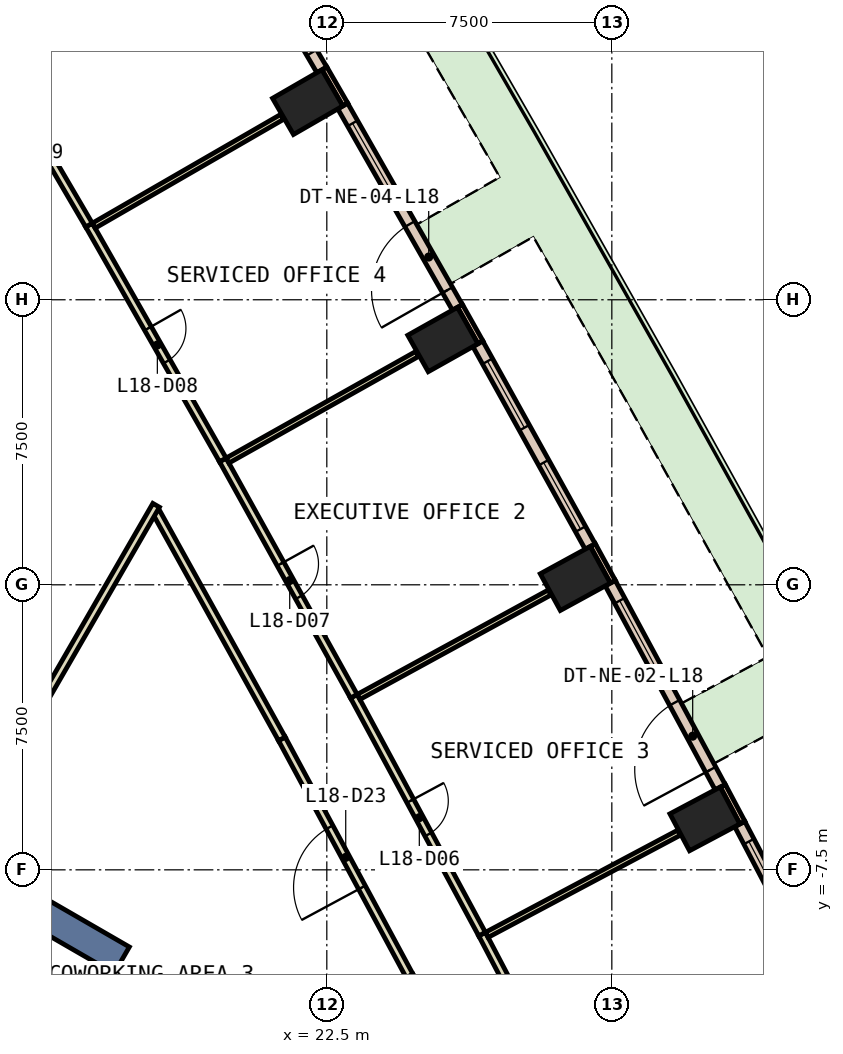
"""IFC4 building model, lengths in metres.
Left out: names, types, materials, properties, quantities, classifications, styles, units other than length and angle.
Written with IfcOpenShell. Run it as: python <this file> out.ifc"""

import sys

from ifc_helpers import new_model, si_unit, direction, frame, frame_2d, origin, origin_2d, place, context, subcontext, project, spatial, rectangle, extrude, element, fill, save


model = new_model("IFC4")
c1 = context("Model", 3, precision=1e-05, world=origin(), true_north=direction((0.0, 1.0)))
c2 = subcontext(c1, "Body", "Model", "MODEL_VIEW")
j1 = project(units=[si_unit("LENGTHUNIT", "METRE"), si_unit("PLANEANGLEUNIT", "RADIAN")], contexts=[c1])
p1 = place(None, origin())
s1 = spatial("IfcSite", under=j1, at=p1, CompositionType="ELEMENT")
p2 = place(p1, origin())
s2 = spatial("IfcBuilding", under=s1, at=p2, CompositionType="ELEMENT")
p3 = place(p2, frame((0.0, 0.0, 86.6)))
s3 = spatial("IfcBuildingStorey", under=s2, at=p3, CompositionType="ELEMENT", Elevation=86.6)
for number, where, z_axis, x_axis in (
    (1, (32.449, -6.16, 0.0), (0.0, 0.0, 1.0), (-0.469, 0.883, 0.0)),
    (2, (29.039, 0.167, 0.0), (0.0, 0.0, 1.0), (-0.48, 0.877, 0.0)),
    (3, (25.554, 6.454, 0.0), (0.0, 0.0, 1.0), (-0.49, 0.872, 0.0)),
    (4, (21.997, 12.7, 0.0), (0.0, 0.0, 1.0), (-0.5, 0.866, 0.0)),
):
    element("IfcColumn", number, at=place(p3, frame(where, z_axis=z_axis, x_axis=x_axis)), inside=s3, PredefinedType="COLUMN", context=c2, shape_type="SweptSolid", body=[
        extrude(rectangle(XDim=1.1, YDim=1.5, at=origin_2d()), origin(), (0.0, 0.0, 1.0), 3.8),
    ])
p4 = place(p3, frame((9.31, -5.375, -0.6), z_axis=(0.0, 0.0, 1.0), x_axis=(0.866017533419, -0.500013631625, 0.0)))
e5 = element("IfcWall", 5, at=p4, inside=s3, PredefinedType="SHEAR", context=c2, shape_type="SweptSolid", body=[
    extrude(rectangle(XDim=9.0, YDim=0.8, at=frame_2d((4.5, 0.0))), origin(), (0.0, 0.0, 1.0), 4.4),
])
p5 = place(p3, frame((33.436, -6.259, 0.0), z_axis=(0.0, 0.0, 1.0), x_axis=(-0.469366248657, 0.883003581319, 0.0)))
e6 = element("IfcWall", 6, at=p5, inside=s3, PredefinedType="STANDARD", context=c2, shape_type="SweptSolid", body=[
    extrude(rectangle(XDim=1.1, YDim=0.15, at=frame_2d((0.55, 0.0))), origin(), (0.0, 0.0, 1.0), 3.8),
])
p6 = place(p3, frame((30.027, 0.08, 0.0), z_axis=(0.0, 0.0, 1.0), x_axis=(-0.479737645119, 0.877411985247, 0.0)))
e7 = element("IfcWall", 7, at=p6, inside=s3, PredefinedType="STANDARD", context=c2, shape_type="SweptSolid", body=[
    extrude(rectangle(XDim=1.101, YDim=0.15, at=frame_2d((0.55, 0.0))), origin(), (0.0, 0.0, 1.0), 3.8),
])
p7 = place(p3, frame((26.543, 6.379, 0.0), z_axis=(0.0, 0.0, 1.0), x_axis=(-0.490008344094, 0.871717742574, 0.0)))
e8 = element("IfcWall", 8, at=p7, inside=s3, PredefinedType="STANDARD", context=c2, shape_type="SweptSolid", body=[
    extrude(rectangle(XDim=1.1, YDim=0.15, at=frame_2d((0.55, 0.0))), origin(), (0.0, 0.0, 1.0), 3.8),
])
p8 = place(p3, frame((22.986, 12.636, 0.0), z_axis=(0.0, 0.0, 1.0), x_axis=(-0.499837685251, 0.86611909597, 0.0)))
e9 = element("IfcWall", 9, at=p8, inside=s3, PredefinedType="STANDARD", context=c2, shape_type="SweptSolid", body=[
    extrude(rectangle(XDim=1.1, YDim=0.15, at=frame_2d((0.55, 0.0))), origin(), (0.0, 0.0, 1.0), 3.8),
])
p9 = place(p3, frame((36.186, -11.676, 0.0), z_axis=(0.0, 0.0, 1.0), x_axis=(-0.464187178015, 0.885737130173, 0.0)))
e10 = element("IfcWall", 10, at=p9, inside=s3, PredefinedType="STANDARD", context=c2, shape_type="SweptSolid", body=[
    extrude(rectangle(XDim=6.075, YDim=0.3, at=frame_2d((3.038, 0.0))), origin(), (0.0, 0.0, 1.0), 3.8),
])
p10 = place(p9, frame((0.519, 0.0, 0.9)))
e11 = element("IfcOpeningElement", 11, at=p10, cuts=e10, PredefinedType="OPENING", context=c2, shape_type="SweptSolid", body=[
    extrude(rectangle(XDim=2.0, YDim=2.6, at=frame_2d((1.0, 1.3))), frame((0.0, 0.16, 0.0), z_axis=(0.0, -1.0, 0.0), x_axis=(1.0, 0.0, 0.0)), (0.0, 0.0, 1.0), 0.32),
])
p11 = place(p9, frame((3.556, 0.0, 0.9)))
e12 = element("IfcOpeningElement", 12, at=p11, cuts=e10, PredefinedType="OPENING", context=c2, shape_type="SweptSolid", body=[
    extrude(rectangle(XDim=2.0, YDim=2.6, at=frame_2d((1.0, 1.3))), frame((0.0, 0.16, 0.0), z_axis=(0.0, -1.0, 0.0), x_axis=(1.0, 0.0, 0.0)), (0.0, 0.0, 1.0), 0.32),
])
p12 = place(p3, frame((32.851, -5.325, 0.0), z_axis=(0.0, 0.0, 1.0), x_axis=(-0.474369552216, 0.880325807829, 0.0)))
e13 = element("IfcWall", 13, at=p12, inside=s3, PredefinedType="STANDARD", context=c2, shape_type="SweptSolid", body=[
    extrude(rectangle(XDim=6.099, YDim=0.3, at=frame_2d((3.049, 0.0))), origin(), (0.0, 0.0, 1.0), 3.8),
])
p13 = place(p12, frame((0.525, 0.0, 0.0)))
e14 = element("IfcOpeningElement", 14, at=p13, cuts=e13, PredefinedType="OPENING", context=c2, shape_type="SweptSolid", body=[
    extrude(rectangle(XDim=2.0, YDim=2.4, at=frame_2d((1.0, 1.2))), frame((0.0, 0.16, 0.0), z_axis=(0.0, -1.0, 0.0), x_axis=(1.0, 0.0, 0.0)), (0.0, 0.0, 1.0), 0.32),
])
p14 = place(p12, frame((3.574, 0.0, 0.9)))
e15 = element("IfcOpeningElement", 15, at=p14, cuts=e13, PredefinedType="OPENING", context=c2, shape_type="SweptSolid", body=[
    extrude(rectangle(XDim=2.0, YDim=2.6, at=frame_2d((1.0, 1.3))), frame((0.0, 0.16, 0.0), z_axis=(0.0, -1.0, 0.0), x_axis=(1.0, 0.0, 0.0)), (0.0, 0.0, 1.0), 0.32),
])
p15 = place(p3, frame((29.431, 1.007, 0.0), z_axis=(0.0, 0.0, 1.0), x_axis=(-0.484823579315, 0.874611969356, 0.0)))
e16 = element("IfcWall", 16, at=p15, inside=s3, PredefinedType="STANDARD", context=c2, shape_type="SweptSolid", body=[
    extrude(rectangle(XDim=6.099, YDim=0.3, at=frame_2d((3.049, 0.0))), origin(), (0.0, 0.0, 1.0), 3.8),
])
p16 = place(p15, frame((0.525, 0.0, 0.9)))
e17 = element("IfcOpeningElement", 17, at=p16, cuts=e16, PredefinedType="OPENING", context=c2, shape_type="SweptSolid", body=[
    extrude(rectangle(XDim=2.0, YDim=2.6, at=frame_2d((1.0, 1.3))), frame((0.0, 0.16, 0.0), z_axis=(0.0, -1.0, 0.0), x_axis=(1.0, 0.0, 0.0)), (0.0, 0.0, 1.0), 0.32),
])
p17 = place(p15, frame((3.574, 0.0, 0.9)))
e18 = element("IfcOpeningElement", 18, at=p17, cuts=e16, PredefinedType="OPENING", context=c2, shape_type="SweptSolid", body=[
    extrude(rectangle(XDim=2.0, YDim=2.6, at=frame_2d((1.0, 1.3))), frame((0.0, 0.16, 0.0), z_axis=(0.0, -1.0, 0.0), x_axis=(1.0, 0.0, 0.0)), (0.0, 0.0, 1.0), 0.32),
])
p18 = place(p3, frame((25.936, 7.299, 0.0), z_axis=(0.0, 0.0, 1.0), x_axis=(-0.49492259535, 0.868937065967, 0.0)))
e19 = element("IfcWall", 19, at=p18, inside=s3, PredefinedType="STANDARD", context=c2, shape_type="SweptSolid", body=[
    extrude(rectangle(XDim=6.098, YDim=0.3, at=frame_2d((3.049, 0.0))), origin(), (0.0, 0.0, 1.0), 3.8),
])
p19 = place(p18, frame((0.525, 0.0, 0.0)))
e20 = element("IfcOpeningElement", 20, at=p19, cuts=e19, PredefinedType="OPENING", context=c2, shape_type="SweptSolid", body=[
    extrude(rectangle(XDim=2.0, YDim=2.4, at=frame_2d((1.0, 1.2))), frame((0.0, 0.16, 0.0), z_axis=(0.0, -1.0, 0.0), x_axis=(1.0, 0.0, 0.0)), (0.0, 0.0, 1.0), 0.32),
])
p20 = place(p18, frame((3.574, 0.0, 0.9)))
e21 = element("IfcOpeningElement", 21, at=p20, cuts=e19, PredefinedType="OPENING", context=c2, shape_type="SweptSolid", body=[
    extrude(rectangle(XDim=2.0, YDim=2.6, at=frame_2d((1.0, 1.3))), frame((0.0, 0.16, 0.0), z_axis=(0.0, -1.0, 0.0), x_axis=(1.0, 0.0, 0.0)), (0.0, 0.0, 1.0), 0.32),
])
p21 = place(p3, frame((22.369, 13.549, 0.0), z_axis=(0.0, 0.0, 1.0), x_axis=(-0.504998117261, 0.863120444413, 0.0)))
e22 = element("IfcWall", 22, at=p21, inside=s3, PredefinedType="STANDARD", context=c2, shape_type="SweptSolid", body=[
    extrude(rectangle(XDim=6.099, YDim=0.3, at=frame_2d((3.049, 0.0))), origin(), (0.0, 0.0, 1.0), 3.8),
])
p22 = place(p21, frame((0.525, 0.0, 0.9)))
e23 = element("IfcOpeningElement", 23, at=p22, cuts=e22, PredefinedType="OPENING", context=c2, shape_type="SweptSolid", body=[
    extrude(rectangle(XDim=2.0, YDim=2.6, at=frame_2d((1.0, 1.3))), frame((0.0, 0.16, 0.0), z_axis=(0.0, -1.0, 0.0), x_axis=(1.0, 0.0, 0.0)), (0.0, 0.0, 1.0), 0.32),
])
p23 = place(p21, frame((3.574, 0.0, 0.9)))
e24 = element("IfcOpeningElement", 24, at=p23, cuts=e22, PredefinedType="OPENING", context=c2, shape_type="SweptSolid", body=[
    extrude(rectangle(XDim=2.0, YDim=2.6, at=frame_2d((1.0, 1.3))), frame((0.0, 0.16, 0.0), z_axis=(0.0, -1.0, 0.0), x_axis=(1.0, 0.0, 0.0)), (0.0, 0.0, 1.0), 0.32),
])
p24 = place(p3, frame((27.461, -15.6, 0.0), z_axis=(0.0, 0.0, 1.0), x_axis=(-0.464203280494, 0.885728691179, 0.0)))
e25 = element("IfcWall", 25, at=p24, inside=s3, PredefinedType="PARTITIONING", context=c2, shape_type="SweptSolid", body=[
    extrude(rectangle(XDim=5.995, YDim=0.2, at=frame_2d((2.998, 0.0))), origin(), (0.0, 0.0, 1.0), 3.8),
])
p25 = place(p3, frame((24.678, -10.29, 0.0), z_axis=(0.0, 0.0, 1.0), x_axis=(-0.474391588657, 0.880313932987, 0.0)))
e26 = element("IfcWall", 26, at=p25, inside=s3, PredefinedType="PARTITIONING", context=c2, shape_type="SweptSolid", body=[
    extrude(rectangle(XDim=7.085, YDim=0.2, at=frame_2d((3.542, 0.0))), origin(), (0.0, 0.0, 1.0), 3.8),
])
p26 = place(p25, frame((2.642, 0.0, 0.0)))
e27 = element("IfcOpeningElement", 27, at=p26, cuts=e26, PredefinedType="OPENING", context=c2, shape_type="SweptSolid", body=[
    extrude(rectangle(XDim=1.8, YDim=2.1, at=frame_2d((0.9, 1.05))), frame((0.0, 0.11, 0.0), z_axis=(0.0, -1.0, 0.0), x_axis=(1.0, 0.0, 0.0)), (0.0, 0.0, 1.0), 0.22),
])
p27 = place(p3, frame((21.317, -4.053, 0.0), z_axis=(0.0, 0.0, 1.0), x_axis=(-0.484816829319, 0.874615711046, 0.0)))
e28 = element("IfcWall", 28, at=p27, inside=s3, PredefinedType="PARTITIONING", context=c2, shape_type="SweptSolid", body=[
    extrude(rectangle(XDim=6.827, YDim=0.2, at=frame_2d((3.414, 0.0))), origin(), (0.0, 0.0, 1.0), 3.8),
])
p28 = place(p3, frame((26.586, -9.191, 0.0), z_axis=(0.0, 0.0, 1.0), x_axis=(0.46422194761, -0.885718907643, 0.0)))
e29 = element("IfcWall", 29, at=p28, inside=s3, PredefinedType="PARTITIONING", context=c2, shape_type="SweptSolid", body=[
    extrude(rectangle(XDim=6.366, YDim=0.2, at=frame_2d((3.183, 0.0))), origin(), (0.0, 0.0, 1.0), 3.8),
])
p29 = place(p28, frame((2.683, 0.0, 0.0)))
e30 = element("IfcOpeningElement", 30, at=p29, cuts=e29, PredefinedType="OPENING", context=c2, shape_type="SweptSolid", body=[
    extrude(rectangle(XDim=1.0, YDim=2.1, at=frame_2d((0.5, 1.05))), frame((0.0, 0.11, 0.0), z_axis=(0.0, -1.0, 0.0), x_axis=(1.0, 0.0, 0.0)), (0.0, 0.0, 1.0), 0.22),
])
p30 = place(p3, frame((23.212, -2.932, 0.0), z_axis=(0.0, 0.0, 1.0), x_axis=(0.474404892994, -0.880306763295, 0.0)))
e31 = element("IfcWall", 31, at=p30, inside=s3, PredefinedType="PARTITIONING", context=c2, shape_type="SweptSolid", body=[
    extrude(rectangle(XDim=7.11, YDim=0.2, at=frame_2d((3.555, 0.0))), origin(), (0.0, 0.0, 1.0), 3.8),
])
p31 = place(p30, frame((3.13, 0.0, 0.0)))
e32 = element("IfcOpeningElement", 32, at=p31, cuts=e31, PredefinedType="OPENING", context=c2, shape_type="SweptSolid", body=[
    extrude(rectangle(XDim=1.0, YDim=2.1, at=frame_2d((0.5, 1.05))), frame((0.0, 0.11, 0.0), z_axis=(0.0, -1.0, 0.0), x_axis=(1.0, 0.0, 0.0)), (0.0, 0.0, 1.0), 0.22),
])
p32 = place(p3, frame((19.764, 3.286, 0.0), z_axis=(0.0, 0.0, 1.0), x_axis=(0.484858403734, -0.874592664232, 0.0)))
e33 = element("IfcWall", 33, at=p32, inside=s3, PredefinedType="PARTITIONING", context=c2, shape_type="SweptSolid", body=[
    extrude(rectangle(XDim=7.109, YDim=0.2, at=frame_2d((3.555, 0.0))), origin(), (0.0, 0.0, 1.0), 3.8),
])
p33 = place(p32, frame((3.13, 0.0, 0.0)))
e34 = element("IfcOpeningElement", 34, at=p33, cuts=e33, PredefinedType="OPENING", context=c2, shape_type="SweptSolid", body=[
    extrude(rectangle(XDim=1.0, YDim=2.1, at=frame_2d((0.5, 1.05))), frame((0.0, 0.11, 0.0), z_axis=(0.0, -1.0, 0.0), x_axis=(1.0, 0.0, 0.0)), (0.0, 0.0, 1.0), 0.22),
])
p34 = place(p3, frame((16.243, 9.465, 0.0), z_axis=(0.0, 0.0, 1.0), x_axis=(0.495081262009, -0.868846674625, 0.0)))
e35 = element("IfcWall", 35, at=p34, inside=s3, PredefinedType="PARTITIONING", context=c2, shape_type="SweptSolid", body=[
    extrude(rectangle(XDim=7.112, YDim=0.2, at=frame_2d((3.556, 0.0))), origin(), (0.0, 0.0, 1.0), 3.8),
])
p35 = place(p34, frame((3.131, 0.0, 0.0)))
e36 = element("IfcOpeningElement", 36, at=p35, cuts=e35, PredefinedType="OPENING", context=c2, shape_type="SweptSolid", body=[
    extrude(rectangle(XDim=1.0, YDim=2.1, at=frame_2d((0.5, 1.05))), frame((0.0, 0.11, 0.0), z_axis=(0.0, -1.0, 0.0), x_axis=(1.0, 0.0, 0.0)), (0.0, 0.0, 1.0), 0.22),
])
p36 = place(p3, frame((12.652, 15.602, 0.0), z_axis=(0.0, 0.0, 1.0), x_axis=(0.504914693075, -0.863169249172, 0.0)))
e37 = element("IfcWall", 37, at=p36, inside=s3, PredefinedType="PARTITIONING", context=c2, shape_type="SweptSolid", body=[
    extrude(rectangle(XDim=7.11, YDim=0.2, at=frame_2d((3.555, 0.0))), origin(), (0.0, 0.0, 1.0), 3.8),
])
p37 = place(p36, frame((3.13, 0.0, 0.0)))
e38 = element("IfcOpeningElement", 38, at=p37, cuts=e37, PredefinedType="OPENING", context=c2, shape_type="SweptSolid", body=[
    extrude(rectangle(XDim=1.0, YDim=2.1, at=frame_2d((0.5, 1.05))), frame((0.0, 0.11, 0.0), z_axis=(0.0, -1.0, 0.0), x_axis=(1.0, 0.0, 0.0)), (0.0, 0.0, 1.0), 0.22),
])
p38 = place(p3, frame((18.009, 2.092, 0.0), z_axis=(0.0, 0.0, 1.0), x_axis=(-0.499980796252, -0.866036490789, 0.0)))
e39 = element("IfcWall", 39, at=p38, inside=s3, PredefinedType="PARTITIONING", context=c2, shape_type="SweptSolid", body=[
    extrude(rectangle(XDim=10.417, YDim=0.2, at=frame_2d((5.208, 0.0))), origin(), (0.0, 0.0, 1.0), 3.8),
])
p39 = place(p3, frame((26.709, -9.211, 0.0), z_axis=(0.0, 0.0, 1.0), x_axis=(0.883057238515, 0.46926529118, 0.0)))
e40 = element("IfcWall", 40, at=p39, inside=s3, PredefinedType="PARTITIONING", context=c2, shape_type="SweptSolid", body=[
    extrude(rectangle(XDim=5.73, YDim=0.15, at=frame_2d((2.865, 0.0))), origin(), (0.0, 0.0, 1.0), 3.8),
])
p40 = place(p3, frame((23.336, -2.95, 0.0), z_axis=(0.0, 0.0, 1.0), x_axis=(0.877455496162, 0.479658057637, 0.0)))
e41 = element("IfcWall", 41, at=p40, inside=s3, PredefinedType="PARTITIONING", context=c2, shape_type="SweptSolid", body=[
    extrude(rectangle(XDim=5.729, YDim=0.15, at=frame_2d((2.865, 0.0))), origin(), (0.0, 0.0, 1.0), 3.8),
])
p41 = place(p3, frame((19.888, 3.27, 0.0), z_axis=(0.0, 0.0, 1.0), x_axis=(0.871789386467, 0.489880868828, 0.0)))
e42 = element("IfcWall", 42, at=p41, inside=s3, PredefinedType="PARTITIONING", context=c2, shape_type="SweptSolid", body=[
    extrude(rectangle(XDim=5.73, YDim=0.15, at=frame_2d((2.865, 0.0))), origin(), (0.0, 0.0, 1.0), 3.8),
])
p42 = place(p3, frame((16.367, 9.45, 0.0), z_axis=(0.0, 0.0, 1.0), x_axis=(0.866061440635, 0.499937577149, 0.0)))
e43 = element("IfcWall", 43, at=p42, inside=s3, PredefinedType="PARTITIONING", context=c2, shape_type="SweptSolid", body=[
    extrude(rectangle(XDim=5.731, YDim=0.15, at=frame_2d((2.865, 0.0))), origin(), (0.0, 0.0, 1.0), 3.8),
])
p43 = place(p11, origin())
e44 = element("IfcWindow", 44, at=p43, inside=s3, PartitioningType="SINGLE_PANEL", PredefinedType="WINDOW", context=c2, shape_type="SweptSolid", body=[
    extrude(rectangle(XDim=2.0, YDim=2.6, at=frame_2d((1.0, 1.3))), frame((0.0, 0.03, 0.0), z_axis=(0.0, -1.0, 0.0), x_axis=(1.0, 0.0, 0.0)), (0.0, 0.0, 1.0), 0.06),
])
fill(e12, e44)
p44 = place(p13, origin())
e45 = element("IfcDoor", 45, at=p44, inside=s3, OperationType="SLIDING_TO_LEFT", PredefinedType="DOOR", context=c2, shape_type="SweptSolid", body=[
    extrude(rectangle(XDim=2.0, YDim=2.4, at=frame_2d((1.0, 1.2))), frame((0.0, 0.025, 0.0), z_axis=(0.0, -1.0, 0.0), x_axis=(1.0, 0.0, 0.0)), (0.0, 0.0, 1.0), 0.05),
])
fill(e14, e45)
p45 = place(p14, origin())
e46 = element("IfcWindow", 46, at=p45, inside=s3, PartitioningType="SINGLE_PANEL", PredefinedType="WINDOW", context=c2, shape_type="SweptSolid", body=[
    extrude(rectangle(XDim=2.0, YDim=2.6, at=frame_2d((1.0, 1.3))), frame((0.0, 0.03, 0.0), z_axis=(0.0, -1.0, 0.0), x_axis=(1.0, 0.0, 0.0)), (0.0, 0.0, 1.0), 0.06),
])
fill(e15, e46)
p46 = place(p16, origin())
e47 = element("IfcWindow", 47, at=p46, inside=s3, PartitioningType="SINGLE_PANEL", PredefinedType="WINDOW", context=c2, shape_type="SweptSolid", body=[
    extrude(rectangle(XDim=2.0, YDim=2.6, at=frame_2d((1.0, 1.3))), frame((0.0, 0.03, 0.0), z_axis=(0.0, -1.0, 0.0), x_axis=(1.0, 0.0, 0.0)), (0.0, 0.0, 1.0), 0.06),
])
fill(e17, e47)
p47 = place(p17, origin())
e48 = element("IfcWindow", 48, at=p47, inside=s3, PartitioningType="SINGLE_PANEL", PredefinedType="WINDOW", context=c2, shape_type="SweptSolid", body=[
    extrude(rectangle(XDim=2.0, YDim=2.6, at=frame_2d((1.0, 1.3))), frame((0.0, 0.03, 0.0), z_axis=(0.0, -1.0, 0.0), x_axis=(1.0, 0.0, 0.0)), (0.0, 0.0, 1.0), 0.06),
])
fill(e18, e48)
p48 = place(p19, origin())
e49 = element("IfcDoor", 49, at=p48, inside=s3, OperationType="SLIDING_TO_LEFT", PredefinedType="DOOR", context=c2, shape_type="SweptSolid", body=[
    extrude(rectangle(XDim=2.0, YDim=2.4, at=frame_2d((1.0, 1.2))), frame((0.0, 0.025, 0.0), z_axis=(0.0, -1.0, 0.0), x_axis=(1.0, 0.0, 0.0)), (0.0, 0.0, 1.0), 0.05),
])
fill(e20, e49)
p49 = place(p20, origin())
e50 = element("IfcWindow", 50, at=p49, inside=s3, PartitioningType="SINGLE_PANEL", PredefinedType="WINDOW", context=c2, shape_type="SweptSolid", body=[
    extrude(rectangle(XDim=2.0, YDim=2.6, at=frame_2d((1.0, 1.3))), frame((0.0, 0.03, 0.0), z_axis=(0.0, -1.0, 0.0), x_axis=(1.0, 0.0, 0.0)), (0.0, 0.0, 1.0), 0.06),
])
fill(e21, e50)
p50 = place(p22, origin())
e51 = element("IfcWindow", 51, at=p50, inside=s3, PartitioningType="SINGLE_PANEL", PredefinedType="WINDOW", context=c2, shape_type="SweptSolid", body=[
    extrude(rectangle(XDim=2.0, YDim=2.6, at=frame_2d((1.0, 1.3))), frame((0.0, 0.03, 0.0), z_axis=(0.0, -1.0, 0.0), x_axis=(1.0, 0.0, 0.0)), (0.0, 0.0, 1.0), 0.06),
])
fill(e23, e51)
p51 = place(p31, origin())
e52 = element("IfcDoor", 52, at=p51, inside=s3, OperationType="SINGLE_SWING_LEFT", PredefinedType="DOOR", context=c2, shape_type="SweptSolid", body=[
    extrude(rectangle(XDim=1.0, YDim=2.1, at=frame_2d((0.5, 1.05))), frame((0.0, 0.025, 0.0), z_axis=(0.0, -1.0, 0.0), x_axis=(1.0, 0.0, 0.0)), (0.0, 0.0, 1.0), 0.05),
])
fill(e32, e52)
p52 = place(p33, origin())
e53 = element("IfcDoor", 53, at=p52, inside=s3, OperationType="SINGLE_SWING_LEFT", PredefinedType="DOOR", context=c2, shape_type="SweptSolid", body=[
    extrude(rectangle(XDim=1.0, YDim=2.1, at=frame_2d((0.5, 1.05))), frame((0.0, 0.025, 0.0), z_axis=(0.0, -1.0, 0.0), x_axis=(1.0, 0.0, 0.0)), (0.0, 0.0, 1.0), 0.05),
])
fill(e34, e53)
p53 = place(p35, origin())
e54 = element("IfcDoor", 54, at=p53, inside=s3, OperationType="SINGLE_SWING_LEFT", PredefinedType="DOOR", context=c2, shape_type="SweptSolid", body=[
    extrude(rectangle(XDim=1.0, YDim=2.1, at=frame_2d((0.5, 1.05))), frame((0.0, 0.025, 0.0), z_axis=(0.0, -1.0, 0.0), x_axis=(1.0, 0.0, 0.0)), (0.0, 0.0, 1.0), 0.05),
])
fill(e36, e54)
p54 = place(p26, origin())
e55 = element("IfcDoor", 55, at=p54, inside=s3, OperationType="DOUBLE_DOOR_SINGLE_SWING", PredefinedType="DOOR", context=c2, shape_type="SweptSolid", body=[
    extrude(rectangle(XDim=1.8, YDim=2.1, at=frame_2d((0.9, 1.05))), frame((0.0, 0.025, 0.0), z_axis=(0.0, -1.0, 0.0), x_axis=(1.0, 0.0, 0.0)), (0.0, 0.0, 1.0), 0.05),
])
fill(e27, e55)
save(model, sys.argv[1])
